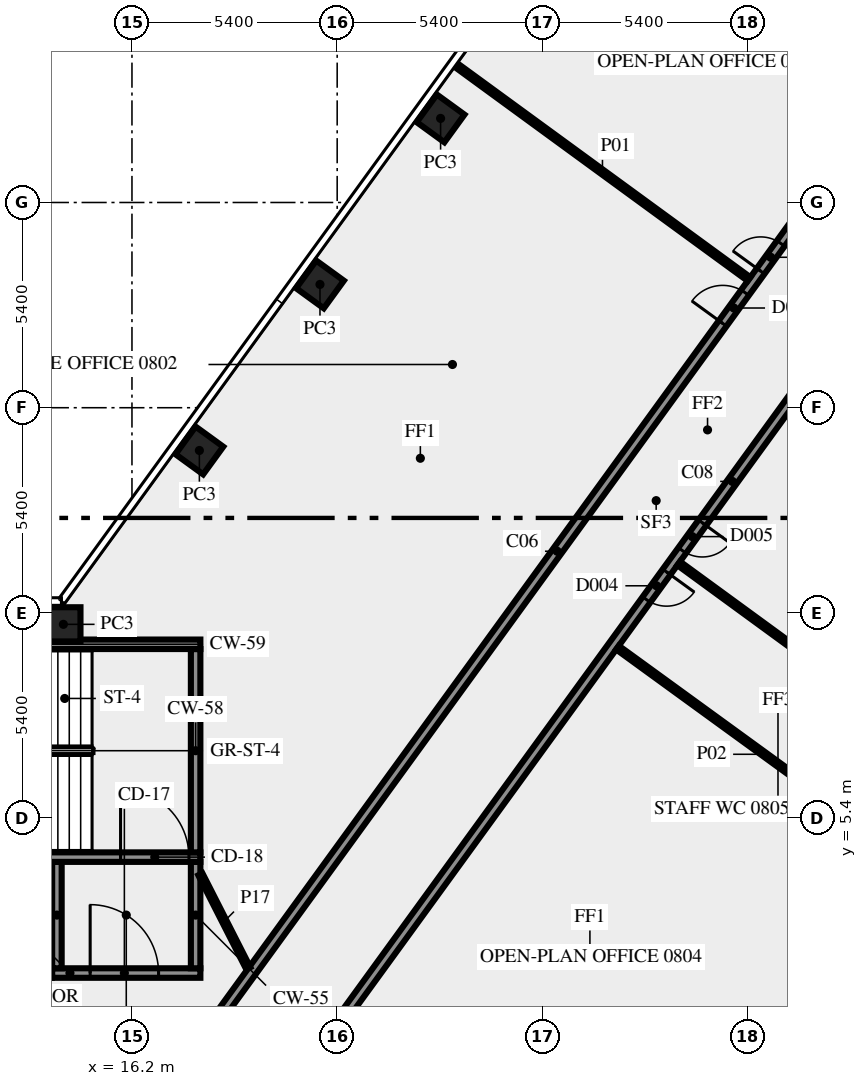
"""IFC4 building model, lengths in metres.
Left out: names, types, materials, properties, quantities, classifications, styles, units other than length and angle.
Written with IfcOpenShell. Run it as: python <this file> out.ifc"""

import sys

from ifc_helpers import new_model, si_unit, direction, frame, frame_2d, origin, origin_2d, place, context, subcontext, project, spatial, rectangle, extrude, element, fill, save


model = new_model("IFC4")
c1 = context("Model", 3, precision=1e-05, world=origin(), true_north=direction((0.0, 1.0)))
c2 = subcontext(c1, "Body", "Model", "MODEL_VIEW")
j1 = project(units=[si_unit("LENGTHUNIT", "METRE"), si_unit("PLANEANGLEUNIT", "RADIAN")], contexts=[c1])
p1 = place(None, origin())
s1 = spatial("IfcSite", under=j1, at=p1, CompositionType="ELEMENT")
p2 = place(p1, origin())
s2 = spatial("IfcBuilding", under=s1, at=p2, CompositionType="ELEMENT")
p3 = place(p2, frame((0.0, 0.0, 39.0)))
s3 = spatial("IfcBuildingStorey", under=s2, at=p3, CompositionType="ELEMENT", Elevation=39.0)
for number, where, z_axis, x_axis in (
    (1, (24.321, 23.812, 0.0), (0.0, 0.0, 1.0), (-0.588, -0.809, 0.0)),
    (2, (21.147, 19.444, 0.0), (0.0, 0.0, 1.0), (-0.588, -0.809, 0.0)),
    (3, (17.974, 15.075, 0.0), (0.0, 0.0, 1.0), (-0.588, -0.809, 0.0)),
    (4, (14.395, 10.5, 0.0), (0.0, 0.0, 1.0), (-1.0, 0.0, 0.0)),
):
    element("IfcColumn", number, at=place(p3, frame(where, z_axis=z_axis, x_axis=x_axis)), inside=s3, PredefinedType="COLUMN", context=c2, shape_type="SweptSolid", body=[
        extrude(rectangle(XDim=0.9, YDim=0.9, at=origin_2d()), origin(), (0.0, 0.0, 1.0), 3.65),
    ])
p4 = place(p3, frame((14.1, 1.325, 0.0), z_axis=(0.0, 0.0, 1.0), x_axis=(1.0, 0.0, 0.0)))
e5 = element("IfcWall", 5, at=p4, inside=s3, PredefinedType="SHEAR", context=c2, shape_type="SweptSolid", body=[
    extrude(rectangle(XDim=3.9, YDim=0.25, at=frame_2d((1.95, 0.0))), origin(), (0.0, 0.0, 1.0), 3.65),
])
p5 = place(p4, frame((1.0, 0.0, 0.0)))
e6 = element("IfcOpeningElement", 6, at=p5, cuts=e5, PredefinedType="OPENING", context=c2, shape_type="SweptSolid", body=[
    extrude(rectangle(XDim=1.8, YDim=2.1, at=frame_2d((0.9, 1.05))), frame((0.0, 0.135, 0.0), z_axis=(0.0, -1.0, 0.0), x_axis=(1.0, 0.0, 0.0)), (0.0, 0.0, 1.0), 0.27),
])
for number, where, z_axis, x_axis in (
    (7, (14.225, 1.45, 0.0), (0.0, 0.0, 1.0), (0.0, 1.0, 0.0)),
    (8, (17.875, 1.45, 0.0), (0.0, 0.0, 1.0), (0.0, 1.0, 0.0)),
):
    element("IfcWall", number, at=place(p3, frame(where, z_axis=z_axis, x_axis=x_axis)), inside=s3, PredefinedType="SHEAR", context=c2, shape_type="SweptSolid", body=[
        extrude(rectangle(XDim=2.8, YDim=0.25, at=frame_2d((1.4, 0.0))), origin(), (0.0, 0.0, 1.0), 3.65),
    ])
p6 = place(p3, frame((7.5, 4.375, 0.0), z_axis=(0.0, 0.0, 1.0), x_axis=(1.0, 0.0, 0.0)))
e9 = element("IfcWall", 9, at=p6, inside=s3, PredefinedType="SHEAR", context=c2, shape_type="SweptSolid", body=[
    extrude(rectangle(XDim=10.5, YDim=0.25, at=frame_2d((5.25, 0.0))), origin(), (0.0, 0.0, 1.0), 3.65),
])
p7 = place(p6, frame((8.4, 0.0, 0.0)))
e10 = element("IfcOpeningElement", 10, at=p7, cuts=e9, PredefinedType="OPENING", context=c2, shape_type="SweptSolid", body=[
    extrude(rectangle(XDim=1.8, YDim=2.1, at=frame_2d((0.9, 1.05))), frame((0.0, 0.135, 0.0), z_axis=(0.0, -1.0, 0.0), x_axis=(1.0, 0.0, 0.0)), (0.0, 0.0, 1.0), 0.27),
])
p8 = place(p3, frame((17.875, 4.5, 0.0), z_axis=(0.0, 0.0, 1.0), x_axis=(0.0, 1.0, 0.0)))
e11 = element("IfcWall", 11, at=p8, inside=s3, PredefinedType="SHEAR", context=c2, shape_type="SweptSolid", body=[
    extrude(rectangle(XDim=5.35, YDim=0.25, at=frame_2d((2.675, 0.0))), origin(), (0.0, 0.0, 1.0), 3.65),
])
p9 = place(p3, frame((7.5, 9.975, 0.0), z_axis=(0.0, 0.0, 1.0), x_axis=(1.0, 0.0, 0.0)))
e12 = element("IfcWall", 12, at=p9, inside=s3, PredefinedType="SHEAR", context=c2, shape_type="SweptSolid", body=[
    extrude(rectangle(XDim=10.5, YDim=0.25, at=frame_2d((5.25, 0.0))), origin(), (0.0, 0.0, 1.0), 3.65),
])
p10 = place(p9, frame((2.0, 0.0, 1.0)))
e13 = element("IfcOpeningElement", 13, at=p10, cuts=e12, PredefinedType="OPENING", context=c2, shape_type="SweptSolid", body=[
    extrude(rectangle(XDim=1.2, YDim=1.2, at=frame_2d((0.6, 0.6))), frame((0.0, 0.135, 0.0), z_axis=(0.0, -1.0, 0.0), x_axis=(1.0, 0.0, 0.0)), (0.0, 0.0, 1.0), 0.27),
])
p11 = place(p3, frame((17.545, -1.125, 0.0), z_axis=(0.0, 0.0, 1.0), x_axis=(0.587786323093, 0.809016216391, 0.0)))
e14 = element("IfcWall", 14, at=p11, inside=s3, PredefinedType="SOLIDWALL", context=c2, shape_type="SweptSolid", body=[
    extrude(rectangle(XDim=33.493, YDim=0.25, at=frame_2d((16.747, 0.0))), origin(), (0.0, 0.0, 1.0), 3.65),
])
p12 = place(p11, frame((25.857, 0.0, 0.0)))
e15 = element("IfcOpeningElement", 15, at=p12, cuts=e14, PredefinedType="OPENING", context=c2, shape_type="SweptSolid", body=[
    extrude(rectangle(XDim=0.9, YDim=2.1, at=frame_2d((0.45, 1.05))), frame((0.0, 0.135, 0.0), z_axis=(0.0, -1.0, 0.0), x_axis=(1.0, 0.0, 0.0)), (0.0, 0.0, 1.0), 0.27),
])
p13 = place(p11, frame((24.157, 0.0, 0.0)))
e16 = element("IfcOpeningElement", 16, at=p13, cuts=e14, PredefinedType="OPENING", context=c2, shape_type="SweptSolid", body=[
    extrude(rectangle(XDim=1.0, YDim=2.1, at=frame_2d((0.5, 1.05))), frame((0.0, 0.135, 0.0), z_axis=(0.0, -1.0, 0.0), x_axis=(1.0, 0.0, 0.0)), (0.0, 0.0, 1.0), 0.27),
])
p14 = place(p3, frame((43.467, 30.045, 0.0), z_axis=(0.0, 0.0, 1.0), x_axis=(-0.587784726077, -0.809017376692, 0.0)))
e17 = element("IfcWall", 17, at=p14, inside=s3, PredefinedType="SOLIDWALL", context=c2, shape_type="SweptSolid", body=[
    extrude(rectangle(XDim=39.02, YDim=0.25, at=frame_2d((19.51, 0.0))), origin(), (0.0, 0.0, 1.0), 3.65),
])
p15 = place(p14, frame((37.588, 0.0, 0.0)))
e18 = element("IfcOpeningElement", 18, at=p15, cuts=e17, PredefinedType="OPENING", context=c2, shape_type="SweptSolid", body=[
    extrude(rectangle(XDim=0.9, YDim=2.1, at=frame_2d((0.45, 1.05))), frame((0.0, 0.135, 0.0), z_axis=(0.0, -1.0, 0.0), x_axis=(1.0, 0.0, 0.0)), (0.0, 0.0, 1.0), 0.27),
])
p16 = place(p14, frame((20.855, 0.0, 0.0)))
e19 = element("IfcOpeningElement", 19, at=p16, cuts=e17, PredefinedType="OPENING", context=c2, shape_type="SweptSolid", body=[
    extrude(rectangle(XDim=0.9, YDim=2.1, at=frame_2d((0.45, 1.05))), frame((0.0, 0.135, 0.0), z_axis=(0.0, -1.0, 0.0), x_axis=(1.0, 0.0, 0.0)), (0.0, 0.0, 1.0), 0.27),
])
p17 = place(p14, frame((7.355, 0.0, 0.0)))
e20 = element("IfcOpeningElement", 20, at=p17, cuts=e17, PredefinedType="OPENING", context=c2, shape_type="SweptSolid", body=[
    extrude(rectangle(XDim=0.9, YDim=2.1, at=frame_2d((0.45, 1.05))), frame((0.0, 0.135, 0.0), z_axis=(0.0, -1.0, 0.0), x_axis=(1.0, 0.0, 0.0)), (0.0, 0.0, 1.0), 0.27),
])
p18 = place(p14, frame((11.404, 0.0, 0.0)))
e21 = element("IfcOpeningElement", 21, at=p18, cuts=e17, PredefinedType="OPENING", context=c2, shape_type="SweptSolid", body=[
    extrude(rectangle(XDim=0.9, YDim=2.1, at=frame_2d((0.45, 1.05))), frame((0.0, 0.135, 0.0), z_axis=(0.0, -1.0, 0.0), x_axis=(1.0, 0.0, 0.0)), (0.0, 0.0, 1.0), 0.27),
])
p19 = place(p14, frame((0.604, 0.0, 0.0)))
e22 = element("IfcOpeningElement", 22, at=p19, cuts=e17, PredefinedType="OPENING", context=c2, shape_type="SweptSolid", body=[
    extrude(rectangle(XDim=0.9, YDim=2.1, at=frame_2d((0.45, 1.05))), frame((0.0, 0.135, 0.0), z_axis=(0.0, -1.0, 0.0), x_axis=(1.0, 0.0, 0.0)), (0.0, 0.0, 1.0), 0.27),
])
p20 = place(p14, frame((22.455, 0.0, 0.0)))
e23 = element("IfcOpeningElement", 23, at=p20, cuts=e17, PredefinedType="OPENING", context=c2, shape_type="SweptSolid", body=[
    extrude(rectangle(XDim=0.9, YDim=2.1, at=frame_2d((0.45, 1.05))), frame((0.0, 0.135, 0.0), z_axis=(0.0, -1.0, 0.0), x_axis=(1.0, 0.0, 0.0)), (0.0, 0.0, 1.0), 0.27),
])
p21 = place(p3, frame((24.724, 25.217, 0.0), z_axis=(0.0, 0.0, 1.0), x_axis=(0.807606997933, -0.589721067023, 0.0)))
e24 = element("IfcWall", 24, at=p21, inside=s3, PredefinedType="PARTITIONING", context=c2, shape_type="SweptSolid", body=[
    extrude(rectangle(XDim=9.55, YDim=0.12, at=frame_2d((4.775, 0.0))), origin(), (0.0, 0.0, 1.0), 2.75),
])
p22 = place(p3, frame((36.702, 4.274, 0.0), z_axis=(0.0, 0.0, 1.0), x_axis=(-0.808998008689, 0.58781138296, 0.0)))
e25 = element("IfcWall", 25, at=p22, inside=s3, PredefinedType="PARTITIONING", context=c2, shape_type="SweptSolid", body=[
    extrude(rectangle(XDim=9.55, YDim=0.12, at=frame_2d((4.775, 0.0))), origin(), (0.0, 0.0, 1.0), 2.75),
])
p23 = place(p3, frame((30.587, 12.104, 0.0), z_axis=(0.0, 0.0, 1.0), x_axis=(0.807590933527, -0.589743066161, 0.0)))
e26 = element("IfcWall", 26, at=p23, inside=s3, PredefinedType="PARTITIONING", context=c2, shape_type="SweptSolid", body=[
    extrude(rectangle(XDim=8.594, YDim=0.12, at=frame_2d((4.297, 0.0))), origin(), (0.0, 0.0, 1.0), 3.65),
])
p24 = place(p3, frame((18.0, 3.925, 0.0), z_axis=(0.0, 0.0, 1.0), x_axis=(0.453950796792, -0.891026752736, 0.0)))
e27 = element("IfcWall", 27, at=p24, inside=s3, PredefinedType="PARTITIONING", context=c2, shape_type="SweptSolid", body=[
    extrude(rectangle(XDim=2.778, YDim=0.12, at=frame_2d((1.389, 0.0))), origin(), (0.0, 0.0, 1.0), 3.65),
])
p25 = place(p5, origin())
e28 = element("IfcDoor", 28, at=p25, inside=s3, OperationType="DOUBLE_DOOR_SINGLE_SWING", PredefinedType="DOOR", context=c2, shape_type="SweptSolid", body=[
    extrude(rectangle(XDim=1.8, YDim=2.1, at=frame_2d((0.9, 1.05))), frame((0.0, 0.025, 0.0), z_axis=(0.0, -1.0, 0.0), x_axis=(1.0, 0.0, 0.0)), (0.0, 0.0, 1.0), 0.05),
])
fill(e6, e28)
p26 = place(p7, origin())
e29 = element("IfcDoor", 29, at=p26, inside=s3, OperationType="DOUBLE_DOOR_SINGLE_SWING", PredefinedType="DOOR", context=c2, shape_type="SweptSolid", body=[
    extrude(rectangle(XDim=1.8, YDim=2.1, at=frame_2d((0.9, 1.05))), frame((0.0, 0.025, 0.0), z_axis=(0.0, -1.0, 0.0), x_axis=(1.0, 0.0, 0.0)), (0.0, 0.0, 1.0), 0.05),
])
fill(e10, e29)
p27 = place(p12, origin())
e30 = element("IfcDoor", 30, at=p27, inside=s3, OperationType="SINGLE_SWING_LEFT", PredefinedType="DOOR", context=c2, shape_type="SweptSolid", body=[
    extrude(rectangle(XDim=0.9, YDim=2.1, at=frame_2d((0.45, 1.05))), frame((0.0, 0.025, 0.0), z_axis=(0.0, -1.0, 0.0), x_axis=(1.0, 0.0, 0.0)), (0.0, 0.0, 1.0), 0.05),
])
fill(e15, e30)
p28 = place(p16, origin())
e31 = element("IfcDoor", 31, at=p28, inside=s3, OperationType="SINGLE_SWING_RIGHT", PredefinedType="DOOR", context=c2, shape_type="SweptSolid", body=[
    extrude(rectangle(XDim=0.9, YDim=2.1, at=frame_2d((0.45, 1.05))), frame((0.0, 0.025, 0.0), z_axis=(0.0, -1.0, 0.0), x_axis=(1.0, 0.0, 0.0)), (0.0, 0.0, 1.0), 0.05),
])
fill(e19, e31)
p29 = place(p13, origin())
e32 = element("IfcDoor", 32, at=p29, inside=s3, OperationType="SINGLE_SWING_RIGHT", PredefinedType="DOOR", context=c2, shape_type="SweptSolid", body=[
    extrude(rectangle(XDim=1.0, YDim=2.1, at=frame_2d((0.5, 1.05))), frame((0.0, 0.025, 0.0), z_axis=(0.0, -1.0, 0.0), x_axis=(1.0, 0.0, 0.0)), (0.0, 0.0, 1.0), 0.05),
])
fill(e16, e32)
p30 = place(p20, origin())
e33 = element("IfcDoor", 33, at=p30, inside=s3, OperationType="SINGLE_SWING_LEFT", PredefinedType="DOOR", context=c2, shape_type="SweptSolid", body=[
    extrude(rectangle(XDim=0.9, YDim=2.1, at=frame_2d((0.45, 1.05))), frame((0.0, 0.025, 0.0), z_axis=(0.0, -1.0, 0.0), x_axis=(1.0, 0.0, 0.0)), (0.0, 0.0, 1.0), 0.05),
])
fill(e23, e33)
save(model, sys.argv[1])
